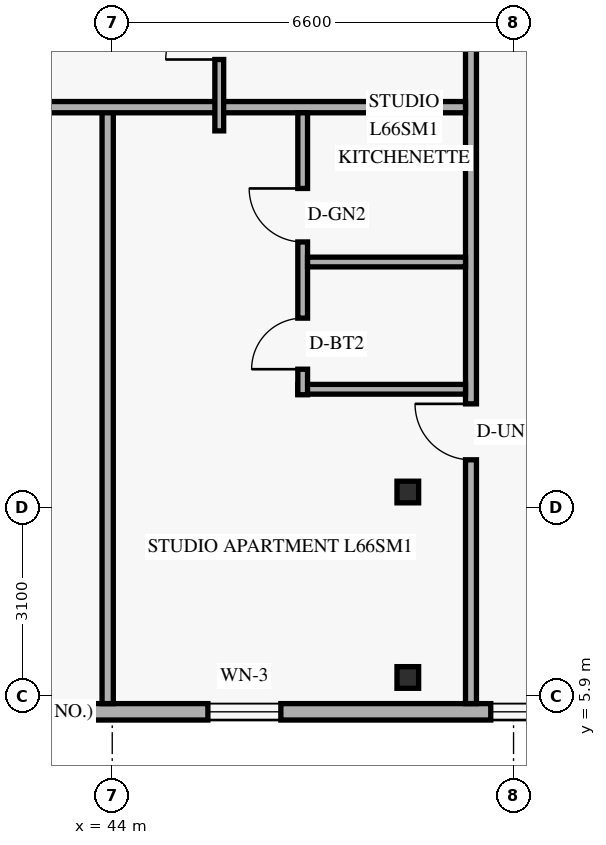
"""IFC4 building model, lengths in metres.
Left out: names, types, materials, properties, quantities, classifications, styles, units other than length and angle.
Written with IfcOpenShell. Run it as: python <this file> out.ifc"""

import sys

from ifc_helpers import new_model, si_unit, direction, frame, frame_2d, origin, origin_2d, place, context, subcontext, project, spatial, rectangle, hollow_rectangle, extrude, element, fill, save


model = new_model("IFC4")
c1 = context("Model", 3, precision=1e-05, world=origin(), true_north=direction((0.0, 1.0)))
c2 = subcontext(c1, "Body", "Model", "MODEL_VIEW")
j1 = project(units=[si_unit("LENGTHUNIT", "METRE"), si_unit("PLANEANGLEUNIT", "RADIAN")], contexts=[c1])
p1 = place(None, origin())
s1 = spatial("IfcSite", under=j1, at=p1, CompositionType="ELEMENT")
p2 = place(p1, origin())
s2 = spatial("IfcBuilding", under=s1, at=p2, CompositionType="ELEMENT")
p3 = place(p2, frame((0.0, 0.0, 253.2)))
s3 = spatial("IfcBuildingStorey", under=s2, at=p3, CompositionType="ELEMENT", Elevation=253.2)
for number, where, z_axis, x_axis in (
    (1, (48.798, 6.2, 0.0), (0.035, 0.0, 0.999), (0.0, 1.0, 0.0)),
    (2, (48.798, 9.25, 0.0), (0.035, 0.0, 0.999), (0.0, 1.0, 0.0)),
):
    element("IfcColumn", number, at=place(p3, frame(where, z_axis=z_axis, x_axis=x_axis)), inside=s3, PredefinedType="COLUMN", context=c2, shape_type="SweptSolid", body=[
        extrude(hollow_rectangle(XDim=0.356, YDim=0.356, WallThickness=0.016, at=origin_2d()), origin(), (0.0, 0.0, 1.0), 3.602),
    ])
p4 = place(p3, frame((25.82, 5.635, 0.0), z_axis=(0.0, 0.0, 1.0), x_axis=(1.0, 0.0, 0.0)))
e3 = element("IfcWall", 3, at=p4, inside=s3, PredefinedType="SOLIDWALL", context=c2, shape_type="SweptSolid", body=[
    extrude(rectangle(XDim=32.96, YDim=0.27, at=frame_2d((16.48, 0.0))), origin(), (0.0, 0.0, 1.0), 3.36),
])
p5 = place(p4, frame((3.87, 0.0, 0.85)))
e4 = element("IfcOpeningElement", 4, at=p5, cuts=e3, PredefinedType="OPENING", context=c2, shape_type="SweptSolid", body=[
    extrude(rectangle(XDim=1.2, YDim=1.5, at=frame_2d((0.6, 0.75))), frame((0.0, 0.145, 0.0), z_axis=(0.0, -1.0, 0.0), x_axis=(1.0, 0.0, 0.0)), (0.0, 0.0, 1.0), 0.29),
])
p6 = place(p4, frame((19.753, 0.0, 0.85)))
e5 = element("IfcOpeningElement", 5, at=p6, cuts=e3, PredefinedType="OPENING", context=c2, shape_type="SweptSolid", body=[
    extrude(rectangle(XDim=1.2, YDim=1.5, at=frame_2d((0.6, 0.75))), frame((0.0, 0.145, 0.0), z_axis=(0.0, -1.0, 0.0), x_axis=(1.0, 0.0, 0.0)), (0.0, 0.0, 1.0), 0.29),
])
p7 = place(p4, frame((24.405, 0.0, 0.85)))
e6 = element("IfcOpeningElement", 6, at=p7, cuts=e3, PredefinedType="OPENING", context=c2, shape_type="SweptSolid", body=[
    extrude(rectangle(XDim=1.2, YDim=1.5, at=frame_2d((0.6, 0.75))), frame((0.0, 0.145, 0.0), z_axis=(0.0, -1.0, 0.0), x_axis=(1.0, 0.0, 0.0)), (0.0, 0.0, 1.0), 0.29),
])
p8 = place(p4, frame((27.958, 0.0, 0.85)))
e7 = element("IfcOpeningElement", 7, at=p8, cuts=e3, PredefinedType="OPENING", context=c2, shape_type="SweptSolid", body=[
    extrude(rectangle(XDim=1.2, YDim=1.5, at=frame_2d((0.6, 0.75))), frame((0.0, 0.145, 0.0), z_axis=(0.0, -1.0, 0.0), x_axis=(1.0, 0.0, 0.0)), (0.0, 0.0, 1.0), 0.29),
])
p9 = place(p3, frame((49.9, 5.77, 0.0), z_axis=(0.0, 0.0, 1.0), x_axis=(0.0, 1.0, 0.0)))
e8 = element("IfcWall", 8, at=p9, inside=s3, PredefinedType="STANDARD", context=c2, shape_type="SweptSolid", body=[
    extrude(rectangle(XDim=15.03, YDim=0.18, at=frame_2d((7.515, 0.0))), origin(), (0.0, 0.0, 1.0), 2.803),
])
p10 = place(p9, frame((4.01, 0.0, 0.0)))
e9 = element("IfcOpeningElement", 9, at=p10, cuts=e8, PredefinedType="OPENING", context=c2, shape_type="SweptSolid", body=[
    extrude(rectangle(XDim=0.92, YDim=2.15, at=frame_2d((0.46, 1.075))), frame((0.0, 0.1, 0.0), z_axis=(0.0, -1.0, 0.0), x_axis=(1.0, 0.0, 0.0)), (0.0, 0.0, 1.0), 0.2),
])
p11 = place(p3, frame((43.925, 5.77, 0.0), z_axis=(0.0, 0.0, 1.0), x_axis=(0.0, 1.0, 0.0)))
e10 = element("IfcWall", 10, at=p11, inside=s3, PredefinedType="PARTITIONING", context=c2, shape_type="SweptSolid", body=[
    extrude(rectangle(XDim=9.81, YDim=0.185, at=frame_2d((4.905, 0.0))), origin(), (0.0, 0.0, 1.0), 2.803),
])
p12 = place(p3, frame((38.022, 15.58, 0.0), z_axis=(0.0, 0.0, 1.0), x_axis=(1.0, 0.0, 0.0)))
e11 = element("IfcWall", 11, at=p12, inside=s3, PredefinedType="PARTITIONING", context=c2, shape_type="SweptSolid", body=[
    extrude(rectangle(XDim=11.788, YDim=0.185, at=frame_2d((5.894, 0.0))), origin(), (0.0, 0.0, 1.0), 2.803),
])
p13 = place(p3, frame((47.052, 10.94, 0.0), z_axis=(0.0, 0.0, 1.0), x_axis=(1.0, 0.0, 0.0)))
e12 = element("IfcWall", 12, at=p13, inside=s3, PredefinedType="PLUMBINGWALL", context=c2, shape_type="SweptSolid", body=[
    extrude(rectangle(XDim=2.758, YDim=0.16, at=frame_2d((1.379, 0.0))), origin(), (0.0, 0.0, 1.0), 2.803),
])
p14 = place(p3, frame((47.132, 10.85, 0.0), z_axis=(0.0, 0.0, 1.0), x_axis=(0.0, 1.0, 0.0)))
e13 = element("IfcWall", 13, at=p14, inside=s3, PredefinedType="PLUMBINGWALL", context=c2, shape_type="SweptSolid", body=[
    extrude(rectangle(XDim=4.637, YDim=0.16, at=frame_2d((2.319, 0.0))), origin(), (0.0, 0.0, 1.0), 3.039),
])
p15 = place(p14, frame((0.42, 0.0, 0.0)))
e14 = element("IfcOpeningElement", 14, at=p15, cuts=e13, PredefinedType="OPENING", context=c2, shape_type="SweptSolid", body=[
    extrude(rectangle(XDim=0.84, YDim=2.12, at=frame_2d((0.42, 1.06))), frame((0.0, 0.09, 0.0), z_axis=(0.0, -1.0, 0.0), x_axis=(1.0, 0.0, 0.0)), (0.0, 0.0, 1.0), 0.18),
])
p16 = place(p14, frame((2.513, 0.0, 0.0)))
e15 = element("IfcOpeningElement", 15, at=p16, cuts=e13, PredefinedType="OPENING", context=c2, shape_type="SweptSolid", body=[
    extrude(rectangle(XDim=0.88, YDim=2.12, at=frame_2d((0.44, 1.06))), frame((0.0, 0.09, 0.0), z_axis=(0.0, -1.0, 0.0), x_axis=(1.0, 0.0, 0.0)), (0.0, 0.0, 1.0), 0.18),
])
p17 = place(p3, frame((47.212, 13.033, 0.0), z_axis=(0.0, 0.0, 1.0), x_axis=(1.0, 0.0, 0.0)))
e16 = element("IfcWall", 16, at=p17, inside=s3, PredefinedType="PLUMBINGWALL", context=c2, shape_type="SweptSolid", body=[
    extrude(rectangle(XDim=2.598, YDim=0.16, at=frame_2d((1.299, 0.0))), origin(), (0.0, 0.0, 1.0), 2.803),
])
p18 = place(p3, frame((45.76, 15.19, 0.0), z_axis=(0.0, 0.0, 1.0), x_axis=(0.0, 1.0, 0.0)))
e17 = element("IfcWall", 17, at=p18, inside=s3, PredefinedType="PARTITIONING", context=c2, shape_type="SweptSolid", body=[
    extrude(rectangle(XDim=5.52, YDim=0.145, at=frame_2d((2.76, 0.0))), origin(), (0.0, 0.0, 1.0), 2.803),
])
p19 = place(p18, frame((1.174, 0.0, 0.0)))
e18 = element("IfcOpeningElement", 18, at=p19, cuts=e17, PredefinedType="OPENING", context=c2, shape_type="SweptSolid", body=[
    extrude(rectangle(XDim=0.88, YDim=2.14, at=frame_2d((0.44, 1.07))), frame((0.0, 0.083, 0.0), z_axis=(0.0, -1.0, 0.0), x_axis=(1.0, 0.0, 0.0)), (0.0, 0.0, 1.0), 0.165),
])
p20 = place(p6, origin())
e19 = element("IfcWindow", 19, at=p20, inside=s3, PartitioningType="SINGLE_PANEL", PredefinedType="WINDOW", context=c2, shape_type="SweptSolid", body=[
    extrude(rectangle(XDim=1.2, YDim=1.5, at=frame_2d((0.6, 0.75))), frame((0.0, 0.03, 0.0), z_axis=(0.0, -1.0, 0.0), x_axis=(1.0, 0.0, 0.0)), (0.0, 0.0, 1.0), 0.06),
])
fill(e5, e19)
p21 = place(p7, origin())
e20 = element("IfcWindow", 20, at=p21, inside=s3, PartitioningType="SINGLE_PANEL", PredefinedType="WINDOW", context=c2, shape_type="SweptSolid", body=[
    extrude(rectangle(XDim=1.2, YDim=1.5, at=frame_2d((0.6, 0.75))), frame((0.0, 0.03, 0.0), z_axis=(0.0, -1.0, 0.0), x_axis=(1.0, 0.0, 0.0)), (0.0, 0.0, 1.0), 0.06),
])
fill(e6, e20)
p22 = place(p10, origin())
e21 = element("IfcDoor", 21, at=p22, inside=s3, OperationType="SINGLE_SWING_RIGHT", PredefinedType="DOOR", context=c2, shape_type="SweptSolid", body=[
    extrude(rectangle(XDim=0.92, YDim=2.15, at=frame_2d((0.46, 1.075))), frame((0.0, 0.025, 0.0), z_axis=(0.0, -1.0, 0.0), x_axis=(1.0, 0.0, 0.0)), (0.0, 0.0, 1.0), 0.05),
])
fill(e9, e21)
p23 = place(p15, origin())
e22 = element("IfcDoor", 22, at=p23, inside=s3, OperationType="SINGLE_SWING_LEFT", PredefinedType="DOOR", context=c2, shape_type="SweptSolid", body=[
    extrude(rectangle(XDim=0.84, YDim=2.12, at=frame_2d((0.42, 1.06))), frame((0.0, 0.025, 0.0), z_axis=(0.0, -1.0, 0.0), x_axis=(1.0, 0.0, 0.0)), (0.0, 0.0, 1.0), 0.05),
])
fill(e14, e22)
p24 = place(p16, origin())
e23 = element("IfcDoor", 23, at=p24, inside=s3, OperationType="SINGLE_SWING_RIGHT", PredefinedType="DOOR", context=c2, shape_type="SweptSolid", body=[
    extrude(rectangle(XDim=0.88, YDim=2.12, at=frame_2d((0.44, 1.06))), frame((0.0, 0.025, 0.0), z_axis=(0.0, -1.0, 0.0), x_axis=(1.0, 0.0, 0.0)), (0.0, 0.0, 1.0), 0.05),
])
fill(e15, e23)
p25 = place(p19, origin())
e24 = element("IfcDoor", 24, at=p25, inside=s3, OperationType="SINGLE_SWING_LEFT", PredefinedType="DOOR", context=c2, shape_type="SweptSolid", body=[
    extrude(rectangle(XDim=0.88, YDim=2.14, at=frame_2d((0.44, 1.07))), frame((0.0, 0.025, 0.0), z_axis=(0.0, -1.0, 0.0), x_axis=(1.0, 0.0, 0.0)), (0.0, 0.0, 1.0), 0.05),
])
fill(e18, e24)
save(model, sys.argv[1])
